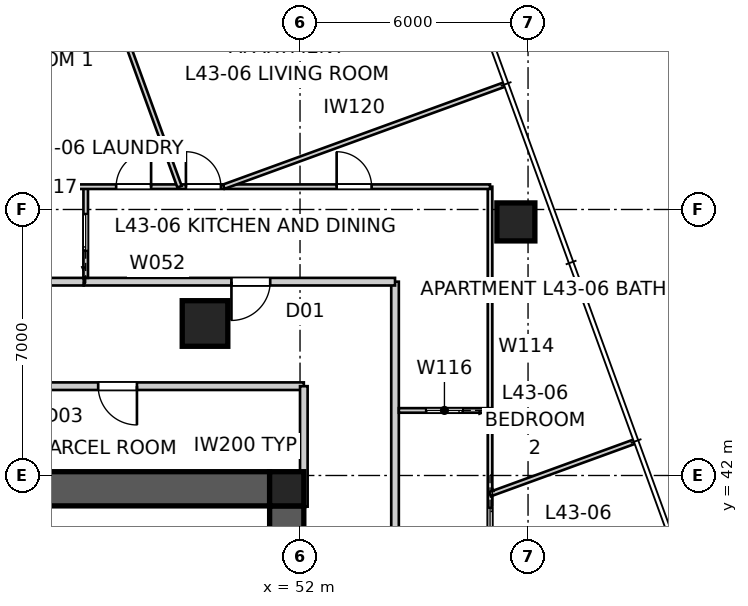
"""IFC4 building model, lengths in metres.
Left out: names, types, materials, properties, quantities, classifications, styles, units other than length and angle.
Written with IfcOpenShell. Run it as: python <this file> out.ifc"""

import sys

from ifc_helpers import new_model, si_unit, direction, frame, frame_2d, origin, origin_2d, place, context, subcontext, project, spatial, polyline, rectangle, outline, extrude, element, fill, save


model = new_model("IFC4")
c1 = context("Model", 3, precision=1e-05, world=origin(), true_north=direction((0.0, 1.0)))
c2 = subcontext(c1, "Body", "Model", "MODEL_VIEW")
j1 = project(units=[si_unit("LENGTHUNIT", "METRE"), si_unit("PLANEANGLEUNIT", "RADIAN")], contexts=[c1])
p1 = place(None, origin())
s1 = spatial("IfcSite", under=j1, at=p1, CompositionType="ELEMENT")
p2 = place(p1, origin())
s2 = spatial("IfcBuilding", under=s1, at=p2, CompositionType="ELEMENT")
p3 = place(p2, frame((0.0, 0.0, 157.4)))
s3 = spatial("IfcBuildingStorey", under=s2, at=p3, CompositionType="ELEMENT", Elevation=157.4)
p4 = place(p3, frame((28.8, 41.65, 0.0), z_axis=(0.0, 0.0, 1.0), x_axis=(1.0, 0.0, 0.0)))
e1 = element("IfcWall", 1, at=p4, inside=s3, PredefinedType="SHEAR", context=c2, shape_type="SweptSolid", body=[
    extrude(outline(polyline([(0.0, -0.45), (22.4, -0.45), (22.4, -0.025), (22.85, -0.025), (22.85, 0.025), (22.4, 0.025), (22.4, 0.45), (0.0, 0.45), (0.0, 0.025), (-0.45, 0.025), (-0.45, -0.025), (0.0, -0.025), (0.0, -0.45)])), origin(), (0.0, 0.0, 1.0), 3.4),
])
p5 = place(p3, frame((51.65, 18.8, 0.0), z_axis=(0.0, 0.0, 1.0), x_axis=(0.0, 1.0, 0.0)))
e2 = element("IfcWall", 2, at=p5, inside=s3, PredefinedType="SHEAR", context=c2, shape_type="SweptSolid", body=[
    extrude(outline(polyline([(0.0, -0.45), (22.4, -0.45), (22.4, -0.025), (22.85, -0.025), (22.85, 0.025), (22.4, 0.025), (22.4, 0.45), (0.0, 0.45), (0.0, 0.025), (-0.45, 0.025), (-0.45, -0.025), (0.0, -0.025), (0.0, -0.45)])), origin(), (0.0, 0.0, 1.0), 3.4),
])
p6 = place(p5, frame((11.14, 0.0, 0.0)))
e3 = element("IfcOpeningElement", 3, at=p6, cuts=e2, PredefinedType="OPENING", context=c2, shape_type="SweptSolid", body=[
    extrude(rectangle(XDim=1.02, YDim=2.4, at=frame_2d((0.51, 1.2))), frame((0.0, 0.46, 0.0), z_axis=(0.0, -1.0, 0.0), x_axis=(1.0, 0.0, 0.0)), (0.0, 0.0, 1.0), 0.92),
])
p7 = place(p3, frame((51.65, 41.65, 0.0), z_axis=(0.0, 0.0, 1.0), x_axis=(1.0, 0.0, 0.0)))
e4 = element("IfcColumn", 4, at=p7, inside=s3, PredefinedType="COLUMN", context=c2, shape_type="SweptSolid", body=[
    extrude(rectangle(XDim=0.9, YDim=0.9, at=origin_2d()), origin(), (0.0, 0.0, 1.0), 3.4),
])
p8 = place(p3, frame((57.68, 48.673, 0.0), z_axis=(0.0, 0.0, 1.0), x_axis=(1.0, 0.0, 0.0)))
e5 = element("IfcColumn", 5, at=p8, inside=s3, PredefinedType="COLUMN", context=c2, shape_type="SweptSolid", body=[
    extrude(rectangle(XDim=1.0, YDim=1.0, at=origin_2d()), origin(), (0.0, 0.0, 1.0), 3.4),
])
p9 = place(p3, frame((49.5, 46.0, 0.0), z_axis=(0.0, 0.0, 1.0), x_axis=(1.0, 0.0, 0.0)))
e6 = element("IfcColumn", 6, at=p9, inside=s3, PredefinedType="COLUMN", context=c2, shape_type="SweptSolid", body=[
    extrude(rectangle(XDim=1.2, YDim=1.2, at=origin_2d()), origin(), (0.0, 0.0, 1.0), 3.4),
])
p10 = place(p3, frame((54.5, 13.7, 0.0), z_axis=(0.0, 0.0, 1.0), x_axis=(0.0, 1.0, 0.0)))
e7 = element("IfcWall", 7, at=p10, inside=s3, PredefinedType="PARTITIONING", context=c2, shape_type="SweptSolid", body=[
    extrude(rectangle(XDim=33.4, YDim=0.2, at=frame_2d((16.7, 0.0))), origin(), (0.0, 0.0, 1.0), 3.25),
])
p11 = place(p10, frame((5.028, 0.0, 0.0)))
e8 = element("IfcOpeningElement", 8, at=p11, cuts=e7, PredefinedType="OPENING", context=c2, shape_type="SweptSolid", body=[
    extrude(rectangle(XDim=1.02, YDim=2.1, at=frame_2d((0.51, 1.05))), frame((0.0, 0.11, 0.0), z_axis=(0.0, -1.0, 0.0), x_axis=(1.0, 0.0, 0.0)), (0.0, 0.0, 1.0), 0.22),
])
p12 = place(p10, frame((13.587, 0.0, 0.0)))
e9 = element("IfcOpeningElement", 9, at=p12, cuts=e7, PredefinedType="OPENING", context=c2, shape_type="SweptSolid", body=[
    extrude(rectangle(XDim=1.02, YDim=2.34, at=frame_2d((0.51, 1.17))), frame((0.0, 0.11, 0.0), z_axis=(0.0, -1.0, 0.0), x_axis=(1.0, 0.0, 0.0)), (0.0, 0.0, 1.0), 0.22),
])
p13 = place(p3, frame((54.5, 47.1, 0.0), z_axis=(0.0, 0.0, 1.0), x_axis=(-1.0, 0.0, 0.0)))
e10 = element("IfcWall", 10, at=p13, inside=s3, PredefinedType="PARTITIONING", context=c2, shape_type="SweptSolid", body=[
    extrude(rectangle(XDim=8.192, YDim=0.2, at=frame_2d((4.096, 0.0))), origin(), (0.0, 0.0, 1.0), 3.25),
])
p14 = place(p13, frame((3.285, 0.0, 0.0)))
e11 = element("IfcOpeningElement", 11, at=p14, cuts=e10, PredefinedType="OPENING", context=c2, shape_type="SweptSolid", body=[
    extrude(rectangle(XDim=1.02, YDim=2.34, at=frame_2d((0.51, 1.17))), frame((0.0, 0.11, 0.0), z_axis=(0.0, -1.0, 0.0), x_axis=(1.0, 0.0, 0.0)), (0.0, 0.0, 1.0), 0.22),
])
p15 = place(p3, frame((46.308, 47.1, 0.0), z_axis=(0.0, 0.0, 1.0), x_axis=(-1.0, 0.0, 0.0)))
e12 = element("IfcWall", 12, at=p15, inside=s3, PredefinedType="PARTITIONING", context=c2, shape_type="SweptSolid", body=[
    extrude(rectangle(XDim=1.683, YDim=0.2, at=frame_2d((0.842, 0.0))), origin(), (0.0, 0.0, 1.0), 2.55),
])
p16 = place(p3, frame((52.1, 44.35, 0.0), z_axis=(0.0, 0.0, 1.0), x_axis=(-1.0, 0.0, 0.0)))
e13 = element("IfcWall", 13, at=p16, inside=s3, PredefinedType="PARTITIONING", context=c2, shape_type="SweptSolid", body=[
    extrude(rectangle(XDim=24.2, YDim=0.2, at=frame_2d((12.1, 0.0))), origin(), (0.0, 0.0, 1.0), 3.25),
])
p17 = place(p16, frame((18.789, 0.0, 0.0)))
e14 = element("IfcOpeningElement", 14, at=p17, cuts=e13, PredefinedType="OPENING", context=c2, shape_type="SweptSolid", body=[
    extrude(rectangle(XDim=1.02, YDim=2.1, at=frame_2d((0.51, 1.05))), frame((0.0, 0.11, 0.0), z_axis=(0.0, -1.0, 0.0), x_axis=(1.0, 0.0, 0.0)), (0.0, 0.0, 1.0), 0.22),
])
p18 = place(p16, frame((4.391, 0.0, 0.0)))
e15 = element("IfcOpeningElement", 15, at=p18, cuts=e13, PredefinedType="OPENING", context=c2, shape_type="SweptSolid", body=[
    extrude(rectangle(XDim=1.02, YDim=2.1, at=frame_2d((0.51, 1.05))), frame((0.0, 0.11, 0.0), z_axis=(0.0, -1.0, 0.0), x_axis=(1.0, 0.0, 0.0)), (0.0, 0.0, 1.0), 0.22),
])
p19 = place(p16, frame((11.59, 0.0, 0.0)))
e16 = element("IfcOpeningElement", 16, at=p19, cuts=e13, PredefinedType="OPENING", context=c2, shape_type="SweptSolid", body=[
    extrude(rectangle(XDim=1.02, YDim=2.1, at=frame_2d((0.51, 1.05))), frame((0.0, 0.11, 0.0), z_axis=(0.0, -1.0, 0.0), x_axis=(1.0, 0.0, 0.0)), (0.0, 0.0, 1.0), 0.22),
])
p20 = place(p3, frame((52.1, 41.18, 0.0), z_axis=(0.0, 0.0, 1.0), x_axis=(0.0, 1.0, 0.0)))
e17 = element("IfcWall", 17, at=p20, inside=s3, PredefinedType="PARTITIONING", context=c2, shape_type="SweptSolid", body=[
    extrude(rectangle(XDim=3.17, YDim=0.2, at=frame_2d((1.585, 0.0))), origin(), (0.0, 0.0, 1.0), 3.25),
])
p21 = place(p3, frame((57.0, 49.6, 0.0), z_axis=(0.0, 0.0, 1.0), x_axis=(0.0, -1.0, 0.0)))
e18 = element("IfcWall", 18, at=p21, inside=s3, PredefinedType="PARTITIONING", context=c2, shape_type="SweptSolid", body=[
    extrude(rectangle(XDim=18.589, YDim=0.12, at=frame_2d((9.294, 0.0))), origin(), (0.0, 0.0, 1.0), 2.55),
])
p22 = place(p21, frame((8.452, 0.0, 0.0)))
e19 = element("IfcOpeningElement", 19, at=p22, cuts=e18, PredefinedType="OPENING", context=c2, shape_type="SweptSolid", body=[
    extrude(rectangle(XDim=0.96, YDim=2.1, at=frame_2d((0.48, 1.05))), frame((0.0, 0.07, 0.0), z_axis=(0.0, -1.0, 0.0), x_axis=(1.0, 0.0, 0.0)), (0.0, 0.0, 1.0), 0.14),
])
p23 = place(p21, frame((11.889, 0.0, 0.0)))
e20 = element("IfcOpeningElement", 20, at=p23, cuts=e18, PredefinedType="OPENING", context=c2, shape_type="SweptSolid", body=[
    extrude(rectangle(XDim=0.96, YDim=2.1, at=frame_2d((0.48, 1.05))), frame((0.0, 0.07, 0.0), z_axis=(0.0, -1.0, 0.0), x_axis=(1.0, 0.0, 0.0)), (0.0, 0.0, 1.0), 0.14),
])
p24 = place(p3, frame((57.0, 43.712, 0.0), z_axis=(0.0, 0.0, 1.0), x_axis=(-1.0, 0.0, 0.0)))
e21 = element("IfcWall", 21, at=p24, inside=s3, PredefinedType="PARTITIONING", context=c2, shape_type="SweptSolid", body=[
    extrude(rectangle(XDim=2.4, YDim=0.12, at=frame_2d((1.2, 0.0))), origin(), (0.0, 0.0, 1.0), 3.25),
])
p25 = place(p24, frame((0.72, 0.0, 0.0)))
e22 = element("IfcOpeningElement", 22, at=p25, cuts=e21, PredefinedType="OPENING", context=c2, shape_type="SweptSolid", body=[
    extrude(rectangle(XDim=0.96, YDim=2.1, at=frame_2d((0.48, 1.05))), frame((0.0, 0.07, 0.0), z_axis=(0.0, -1.0, 0.0), x_axis=(1.0, 0.0, 0.0)), (0.0, 0.0, 1.0), 0.14),
])
p26 = place(p3, frame((46.361, 47.2, 0.0), z_axis=(0.0, 0.0, 1.0), x_axis=(0.0, 1.0, 0.0)))
e23 = element("IfcWall", 23, at=p26, inside=s3, PredefinedType="PARTITIONING", context=c2, shape_type="SweptSolid", body=[
    extrude(rectangle(XDim=2.4, YDim=0.12, at=frame_2d((1.2, 0.0))), origin(), (0.0, 0.0, 1.0), 3.25),
])
p27 = place(p26, frame((0.72, 0.0, 0.0)))
e24 = element("IfcOpeningElement", 24, at=p27, cuts=e23, PredefinedType="OPENING", context=c2, shape_type="SweptSolid", body=[
    extrude(rectangle(XDim=0.96, YDim=2.1, at=frame_2d((0.48, 1.05))), frame((0.0, 0.07, 0.0), z_axis=(0.0, -1.0, 0.0), x_axis=(1.0, 0.0, 0.0)), (0.0, 0.0, 1.0), 0.14),
])
p28 = place(p3, frame((27.545, 49.6, 0.0), z_axis=(0.0, 0.0, 1.0), x_axis=(1.0, 0.0, 0.0)))
e25 = element("IfcWall", 25, at=p28, inside=s3, PredefinedType="PARTITIONING", context=c2, shape_type="SweptSolid", body=[
    extrude(rectangle(XDim=29.455, YDim=0.12, at=frame_2d((14.727, 0.0))), origin(), (0.0, 0.0, 1.0), 3.25),
])
p29 = place(p28, frame((4.887, 0.0, 0.0)))
e26 = element("IfcOpeningElement", 26, at=p29, cuts=e25, PredefinedType="OPENING", context=c2, shape_type="SweptSolid", body=[
    extrude(rectangle(XDim=0.92, YDim=2.34, at=frame_2d((0.46, 1.17))), frame((0.0, 0.07, 0.0), z_axis=(0.0, -1.0, 0.0), x_axis=(1.0, 0.0, 0.0)), (0.0, 0.0, 1.0), 0.14),
])
p30 = place(p28, frame((25.418, 0.0, 0.0)))
e27 = element("IfcOpeningElement", 27, at=p30, cuts=e25, PredefinedType="OPENING", context=c2, shape_type="SweptSolid", body=[
    extrude(rectangle(XDim=0.92, YDim=2.34, at=frame_2d((0.46, 1.17))), frame((0.0, 0.07, 0.0), z_axis=(0.0, -1.0, 0.0), x_axis=(1.0, 0.0, 0.0)), (0.0, 0.0, 1.0), 0.14),
])
p31 = place(p28, frame((19.616, 0.0, 0.0)))
e28 = element("IfcOpeningElement", 28, at=p31, cuts=e25, PredefinedType="OPENING", context=c2, shape_type="SweptSolid", body=[
    extrude(rectangle(XDim=0.92, YDim=2.34, at=frame_2d((0.46, 1.17))), frame((0.0, 0.07, 0.0), z_axis=(0.0, -1.0, 0.0), x_axis=(1.0, 0.0, 0.0)), (0.0, 0.0, 1.0), 0.14),
])
p32 = place(p28, frame((21.452, 0.0, 0.0)))
e29 = element("IfcOpeningElement", 29, at=p32, cuts=e25, PredefinedType="OPENING", context=c2, shape_type="SweptSolid", body=[
    extrude(rectangle(XDim=0.92, YDim=2.34, at=frame_2d((0.46, 1.17))), frame((0.0, 0.07, 0.0), z_axis=(0.0, -1.0, 0.0), x_axis=(1.0, 0.0, 0.0)), (0.0, 0.0, 1.0), 0.14),
])
p33 = place(p3, frame((48.829, 49.6, 0.0), z_axis=(0.0, 0.0, 1.0), x_axis=(-0.34202238111, 0.939691806296, 0.0)))
e30 = element("IfcWall", 30, at=p33, inside=s3, PredefinedType="PARTITIONING", context=c2, shape_type="SweptSolid", body=[
    extrude(rectangle(XDim=8.562, YDim=0.12, at=frame_2d((4.281, 0.0))), origin(), (0.0, 0.0, 1.0), 3.25),
])
p34 = place(p3, frame((57.385, 52.29, 0.0), z_axis=(0.0, 0.0, 1.0), x_axis=(-0.939694604347, -0.342014693486, 0.0)))
e31 = element("IfcWall", 31, at=p34, inside=s3, PredefinedType="PARTITIONING", context=c2, shape_type="SweptSolid", body=[
    extrude(rectangle(XDim=7.866, YDim=0.12, at=frame_2d((3.933, 0.0))), origin(), (0.0, 0.0, 1.0), 3.25),
])
p35 = place(p3, frame((60.805, 42.893, 0.0), z_axis=(0.0, 0.0, 1.0), x_axis=(-0.939682468191, -0.342048036063, 0.0)))
e32 = element("IfcWall", 32, at=p35, inside=s3, PredefinedType="PARTITIONING", context=c2, shape_type="SweptSolid", body=[
    extrude(rectangle(XDim=4.049, YDim=0.12, at=frame_2d((2.024, 0.0))), origin(), (0.0, 0.0, 1.0), 3.25),
])
p36 = place(p18, origin())
e33 = element("IfcDoor", 33, at=p36, inside=s3, OperationType="SINGLE_SWING_LEFT", PredefinedType="DOOR", context=c2, shape_type="SweptSolid", body=[
    extrude(rectangle(XDim=1.02, YDim=2.1, at=frame_2d((0.51, 1.05))), frame((0.0, 0.025, 0.0), z_axis=(0.0, -1.0, 0.0), x_axis=(1.0, 0.0, 0.0)), (0.0, 0.0, 1.0), 0.05),
])
fill(e15, e33)
p37 = place(p14, origin())
e34 = element("IfcDoor", 34, at=p37, inside=s3, OperationType="SINGLE_SWING_RIGHT", PredefinedType="DOOR", context=c2, shape_type="SweptSolid", body=[
    extrude(rectangle(XDim=1.02, YDim=2.34, at=frame_2d((0.51, 1.17))), frame((0.0, 0.025, 0.0), z_axis=(0.0, -1.0, 0.0), x_axis=(1.0, 0.0, 0.0)), (0.0, 0.0, 1.0), 0.05),
])
fill(e11, e34)
p38 = place(p30, origin())
e35 = element("IfcDoor", 35, at=p38, inside=s3, OperationType="SINGLE_SWING_LEFT", PredefinedType="DOOR", context=c2, shape_type="SweptSolid", body=[
    extrude(rectangle(XDim=0.92, YDim=2.34, at=frame_2d((0.46, 1.17))), frame((0.0, 0.025, 0.0), z_axis=(0.0, -1.0, 0.0), x_axis=(1.0, 0.0, 0.0)), (0.0, 0.0, 1.0), 0.05),
])
fill(e27, e35)
p39 = place(p31, origin())
e36 = element("IfcDoor", 36, at=p39, inside=s3, OperationType="SINGLE_SWING_RIGHT", PredefinedType="DOOR", context=c2, shape_type="SweptSolid", body=[
    extrude(rectangle(XDim=0.92, YDim=2.34, at=frame_2d((0.46, 1.17))), frame((0.0, 0.025, 0.0), z_axis=(0.0, -1.0, 0.0), x_axis=(1.0, 0.0, 0.0)), (0.0, 0.0, 1.0), 0.05),
])
fill(e28, e36)
p40 = place(p25, origin())
e37 = element("IfcDoor", 37, at=p40, inside=s3, OperationType="SLIDING_TO_LEFT", PredefinedType="DOOR", context=c2, shape_type="SweptSolid", body=[
    extrude(rectangle(XDim=0.96, YDim=2.1, at=frame_2d((0.48, 1.05))), frame((0.0, 0.025, 0.0), z_axis=(0.0, -1.0, 0.0), x_axis=(1.0, 0.0, 0.0)), (0.0, 0.0, 1.0), 0.05),
])
fill(e22, e37)
p41 = place(p27, origin())
e38 = element("IfcDoor", 38, at=p41, inside=s3, OperationType="SLIDING_TO_LEFT", PredefinedType="DOOR", context=c2, shape_type="SweptSolid", body=[
    extrude(rectangle(XDim=0.96, YDim=2.1, at=frame_2d((0.48, 1.05))), frame((0.0, 0.025, 0.0), z_axis=(0.0, -1.0, 0.0), x_axis=(1.0, 0.0, 0.0)), (0.0, 0.0, 1.0), 0.05),
])
fill(e24, e38)
p42 = place(p32, origin())
e39 = element("IfcDoor", 39, at=p42, inside=s3, OperationType="SINGLE_SWING_LEFT", PredefinedType="DOOR", context=c2, shape_type="SweptSolid", body=[
    extrude(rectangle(XDim=0.92, YDim=2.34, at=frame_2d((0.46, 1.17))), frame((0.0, 0.025, 0.0), z_axis=(0.0, -1.0, 0.0), x_axis=(1.0, 0.0, 0.0)), (0.0, 0.0, 1.0), 0.05),
])
fill(e29, e39)
p43 = place(p22, origin())
e40 = element("IfcDoor", 40, at=p43, inside=s3, OperationType="SLIDING_TO_LEFT", PredefinedType="DOOR", context=c2, shape_type="SweptSolid", body=[
    extrude(rectangle(XDim=0.96, YDim=2.1, at=frame_2d((0.48, 1.05))), frame((0.0, 0.025, 0.0), z_axis=(0.0, -1.0, 0.0), x_axis=(1.0, 0.0, 0.0)), (0.0, 0.0, 1.0), 0.05),
])
fill(e19, e40)
save(model, sys.argv[1])
